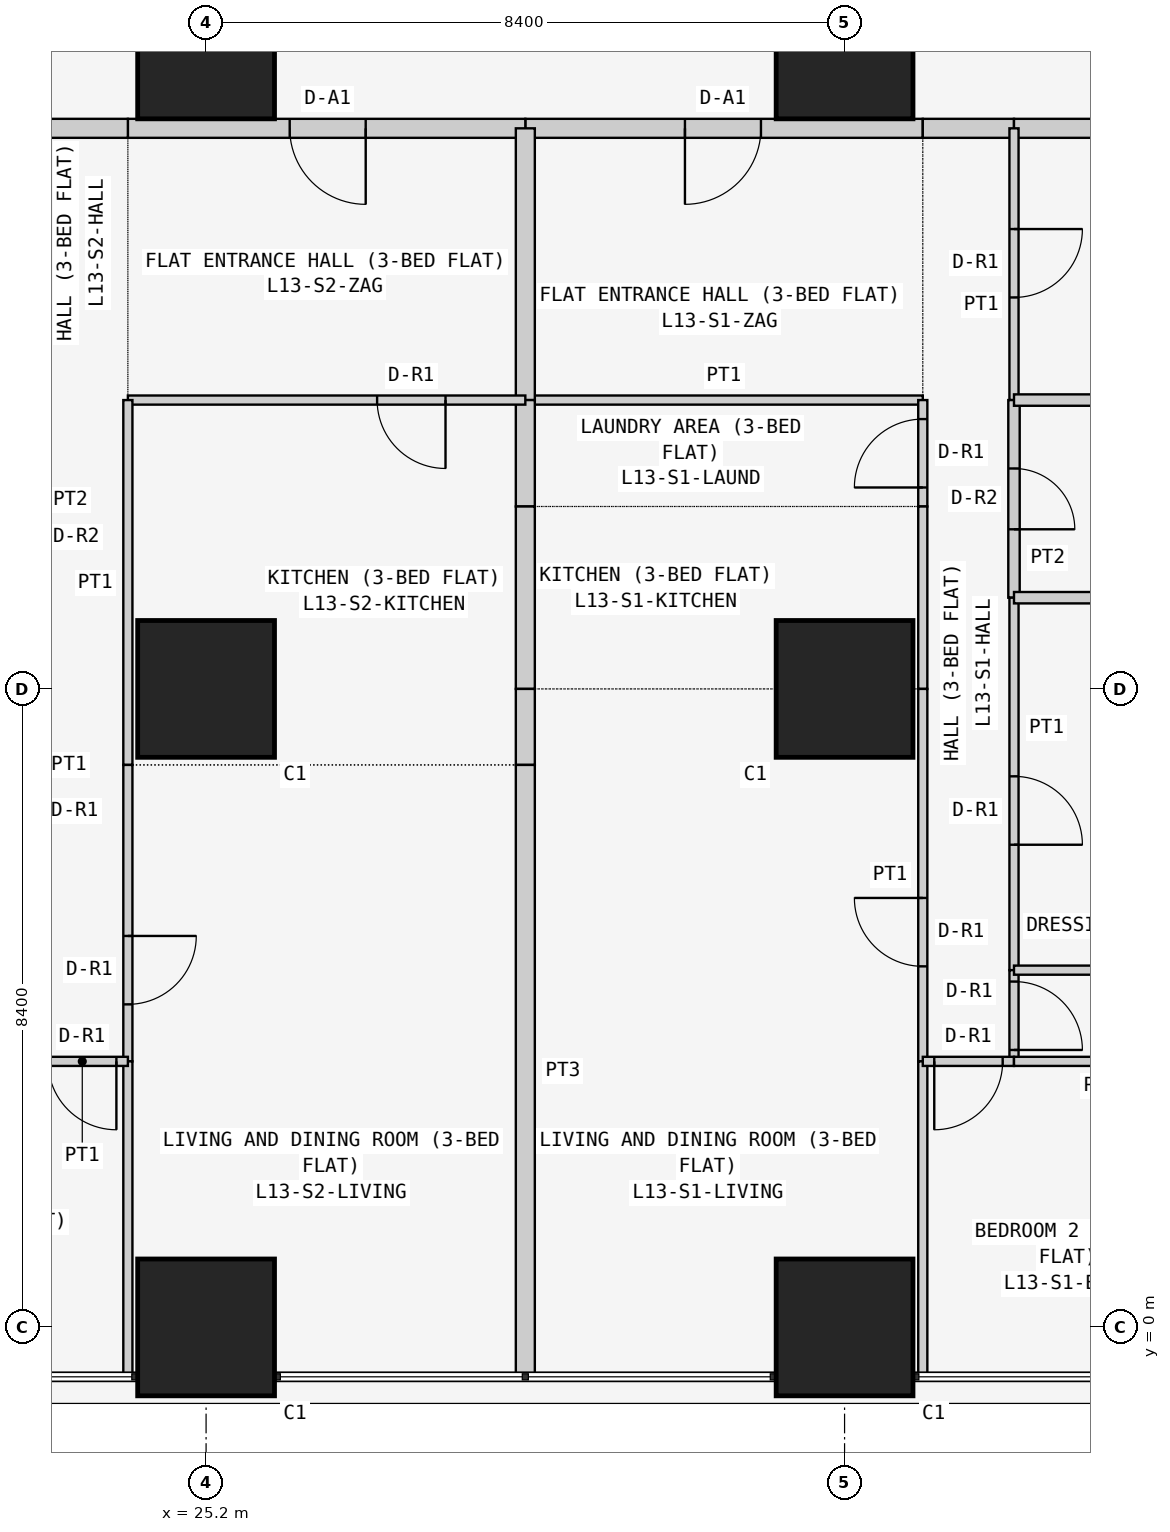
"""IFC4 building model, lengths in metres.
Left out: names, types, materials, properties, quantities, classifications, styles, units other than length and angle.
Written with IfcOpenShell. Run it as: python <this file> out.ifc"""

import sys

from ifc_helpers import new_model, si_unit, direction, frame, frame_2d, origin, origin_2d, place, context, subcontext, project, spatial, rectangle, extrude, element, fill, save


model = new_model("IFC4")
c1 = context("Model", 3, precision=1e-05, world=origin(), true_north=direction((0.0, 1.0)))
c2 = subcontext(c1, "Body", "Model", "MODEL_VIEW")
j1 = project(units=[si_unit("LENGTHUNIT", "METRE"), si_unit("PLANEANGLEUNIT", "RADIAN")], contexts=[c1])
p1 = place(None, origin())
s1 = spatial("IfcSite", under=j1, at=p1, CompositionType="ELEMENT")
p2 = place(p1, origin())
s2 = spatial("IfcBuilding", under=s1, at=p2, CompositionType="ELEMENT")
p3 = place(p2, frame((0.0, 0.0, 56.1)))
s3 = spatial("IfcBuildingStorey", under=s2, at=p3, CompositionType="ELEMENT", Elevation=56.1)
for number, where, z_axis, x_axis in (
    (1, (25.2, 0.0, 0.0), (0.0, 0.0, 1.0), (1.0, 0.0, 0.0)),
    (2, (25.2, 8.4, 0.0), (0.0, 0.0, 1.0), (1.0, 0.0, 0.0)),
    (3, (25.2, 16.8, 0.0), (0.0, 0.0, 1.0), (1.0, 0.0, 0.0)),
    (4, (33.6, 0.0, 0.0), (0.0, 0.0, 1.0), (1.0, 0.0, 0.0)),
    (5, (33.6, 8.4, 0.0), (0.0, 0.0, 1.0), (1.0, 0.0, 0.0)),
    (6, (33.6, 16.8, 0.0), (0.0, 0.0, 1.0), (1.0, 0.0, 0.0)),
):
    element("IfcColumn", number, at=place(p3, frame(where, z_axis=z_axis, x_axis=x_axis)), inside=s3, PredefinedType="COLUMN", context=c2, shape_type="SweptSolid", body=[
        extrude(rectangle(XDim=1.8, YDim=1.8, at=origin_2d()), origin(), (0.0, 0.0, 1.0), 3.6),
    ])
p4 = place(p3, frame((34.629, 15.775, 0.0), z_axis=(0.0, 0.0, 1.0), x_axis=(-1.0, 0.0, 0.0)))
e7 = element("IfcWall", 7, at=p4, inside=s3, PredefinedType="PARTITIONING", context=c2, shape_type="SweptSolid", body=[
    extrude(rectangle(XDim=5.229, YDim=0.25, at=frame_2d((2.615, 0.0))), origin(), (0.0, 0.0, 1.0), 3.45),
])
p5 = place(p4, frame((2.129, 0.0, 0.0)))
e8 = element("IfcOpeningElement", 8, at=p5, cuts=e7, PredefinedType="OPENING", context=c2, shape_type="SweptSolid", body=[
    extrude(rectangle(XDim=1.0, YDim=2.1, at=frame_2d((0.5, 1.05))), frame((0.0, 0.135, 0.0), z_axis=(0.0, -1.0, 0.0), x_axis=(1.0, 0.0, 0.0)), (0.0, 0.0, 1.0), 0.27),
])
p6 = place(p3, frame((35.829, 15.775, 0.0), z_axis=(0.0, 0.0, 1.0), x_axis=(-1.0, 0.0, 0.0)))
e9 = element("IfcWall", 9, at=p6, inside=s3, PredefinedType="PARTITIONING", context=c2, shape_type="SweptSolid", body=[
    extrude(rectangle(XDim=1.2, YDim=0.25, at=frame_2d((0.6, 0.0))), origin(), (0.0, 0.0, 1.0), 3.45),
])
p7 = place(p3, frame((42.7, 15.775, 0.0), z_axis=(0.0, 0.0, 1.0), x_axis=(-1.0, 0.0, 0.0)))
e10 = element("IfcWall", 10, at=p7, inside=s3, PredefinedType="PARTITIONING", context=c2, shape_type="SweptSolid", body=[
    extrude(rectangle(XDim=6.871, YDim=0.25, at=frame_2d((3.436, 0.0))), origin(), (0.0, 0.0, 1.0), 3.45),
])
p8 = place(p3, frame((29.4, 15.775, 0.0), z_axis=(0.0, 0.0, 1.0), x_axis=(-1.0, 0.0, 0.0)))
e11 = element("IfcWall", 11, at=p8, inside=s3, PredefinedType="PARTITIONING", context=c2, shape_type="SweptSolid", body=[
    extrude(rectangle(XDim=5.229, YDim=0.25, at=frame_2d((2.615, 0.0))), origin(), (0.0, 0.0, 1.0), 3.45),
])
p9 = place(p8, frame((2.1, 0.0, 0.0)))
e12 = element("IfcOpeningElement", 12, at=p9, cuts=e11, PredefinedType="OPENING", context=c2, shape_type="SweptSolid", body=[
    extrude(rectangle(XDim=1.0, YDim=2.1, at=frame_2d((0.5, 1.05))), frame((0.0, 0.135, 0.0), z_axis=(0.0, -1.0, 0.0), x_axis=(1.0, 0.0, 0.0)), (0.0, 0.0, 1.0), 0.27),
])
p10 = place(p3, frame((24.171, 15.775, 0.0), z_axis=(0.0, 0.0, 1.0), x_axis=(-1.0, 0.0, 0.0)))
e13 = element("IfcWall", 13, at=p10, inside=s3, PredefinedType="PARTITIONING", context=c2, shape_type="SweptSolid", body=[
    extrude(rectangle(XDim=1.2, YDim=0.25, at=frame_2d((0.6, 0.0))), origin(), (0.0, 0.0, 1.0), 3.45),
])
p11 = place(p3, frame((29.4, 12.2, 0.0), z_axis=(0.0, 0.0, 1.0), x_axis=(1.0, 0.0, 0.0)))
e14 = element("IfcWall", 14, at=p11, inside=s3, PredefinedType="PARTITIONING", context=c2, shape_type="SweptSolid", body=[
    extrude(rectangle(XDim=5.229, YDim=0.12, at=frame_2d((2.615, 0.0))), origin(), (0.0, 0.0, 1.0), 3.45),
])
p12 = place(p3, frame((29.4, 15.775, 0.0), z_axis=(0.0, 0.0, 1.0), x_axis=(0.0, -1.0, 0.0)))
e15 = element("IfcWall", 15, at=p12, inside=s3, PredefinedType="PARTITIONING", context=c2, shape_type="SweptSolid", body=[
    extrude(rectangle(XDim=3.575, YDim=0.25, at=frame_2d((1.788, 0.0))), origin(), (0.0, 0.0, 1.0), 2.848),
])
p13 = place(p3, frame((34.629, 10.8, 0.0), z_axis=(0.0, 0.0, 1.0), x_axis=(0.0, 1.0, 0.0)))
e16 = element("IfcWall", 16, at=p13, inside=s3, PredefinedType="PARTITIONING", context=c2, shape_type="SweptSolid", body=[
    extrude(rectangle(XDim=1.4, YDim=0.12, at=frame_2d((0.7, 0.0))), origin(), (0.0, 0.0, 1.0), 3.45),
])
p14 = place(p13, frame((0.25, 0.0, 0.0)))
e17 = element("IfcOpeningElement", 17, at=p14, cuts=e16, PredefinedType="OPENING", context=c2, shape_type="SweptSolid", body=[
    extrude(rectangle(XDim=0.9, YDim=2.1, at=frame_2d((0.45, 1.05))), frame((0.0, 0.07, 0.0), z_axis=(0.0, -1.0, 0.0), x_axis=(1.0, 0.0, 0.0)), (0.0, 0.0, 1.0), 0.14),
])
p15 = place(p3, frame((29.4, 12.2, 0.0), z_axis=(0.0, 0.0, 1.0), x_axis=(0.0, -1.0, 0.0)))
e18 = element("IfcWall", 18, at=p15, inside=s3, PredefinedType="PARTITIONING", context=c2, shape_type="SweptSolid", body=[
    extrude(rectangle(XDim=1.4, YDim=0.25, at=frame_2d((0.7, 0.0))), origin(), (0.0, 0.0, 1.0), 2.848),
])
p16 = place(p3, frame((34.629, 8.4, 0.0), z_axis=(0.0, 0.0, 1.0), x_axis=(0.0, 1.0, 0.0)))
e19 = element("IfcWall", 19, at=p16, inside=s3, PredefinedType="PARTITIONING", context=c2, shape_type="SweptSolid", body=[
    extrude(rectangle(XDim=2.4, YDim=0.12, at=frame_2d((1.2, 0.0))), origin(), (0.0, 0.0, 1.0), 3.45),
])
p17 = place(p3, frame((29.4, 10.8, 0.0), z_axis=(0.0, 0.0, 1.0), x_axis=(0.0, -1.0, 0.0)))
e20 = element("IfcWall", 20, at=p17, inside=s3, PredefinedType="PARTITIONING", context=c2, shape_type="SweptSolid", body=[
    extrude(rectangle(XDim=2.4, YDim=0.25, at=frame_2d((1.2, 0.0))), origin(), (0.0, 0.0, 1.0), 2.848),
])
p18 = place(p3, frame((34.629, 3.5, 0.0), z_axis=(0.0, 0.0, 1.0), x_axis=(0.0, 1.0, 0.0)))
e21 = element("IfcWall", 21, at=p18, inside=s3, PredefinedType="PARTITIONING", context=c2, shape_type="SweptSolid", body=[
    extrude(rectangle(XDim=4.9, YDim=0.12, at=frame_2d((2.45, 0.0))), origin(), (0.0, 0.0, 1.0), 3.45),
])
p19 = place(p18, frame((1.25, 0.0, 0.0)))
e22 = element("IfcOpeningElement", 22, at=p19, cuts=e21, PredefinedType="OPENING", context=c2, shape_type="SweptSolid", body=[
    extrude(rectangle(XDim=0.9, YDim=2.1, at=frame_2d((0.45, 1.05))), frame((0.0, 0.07, 0.0), z_axis=(0.0, -1.0, 0.0), x_axis=(1.0, 0.0, 0.0)), (0.0, 0.0, 1.0), 0.14),
])
p20 = place(p3, frame((34.629, -0.65, 0.0), z_axis=(0.0, 0.0, 1.0), x_axis=(0.0, 1.0, 0.0)))
e23 = element("IfcWall", 23, at=p20, inside=s3, PredefinedType="PARTITIONING", context=c2, shape_type="SweptSolid", body=[
    extrude(rectangle(XDim=4.15, YDim=0.12, at=frame_2d((2.075, 0.0))), origin(), (0.0, 0.0, 1.0), 3.45),
])
p21 = place(p3, frame((29.4, 8.4, 0.0), z_axis=(0.0, 0.0, 1.0), x_axis=(0.0, -1.0, 0.0)))
e24 = element("IfcWall", 24, at=p21, inside=s3, PredefinedType="PARTITIONING", context=c2, shape_type="SweptSolid", body=[
    extrude(rectangle(XDim=1.0, YDim=0.25, at=frame_2d((0.5, 0.0))), origin(), (0.0, 0.0, 1.0), 2.848),
])
p22 = place(p3, frame((29.4, 7.4, 0.0), z_axis=(0.0, 0.0, 1.0), x_axis=(0.0, -1.0, 0.0)))
e25 = element("IfcWall", 25, at=p22, inside=s3, PredefinedType="PARTITIONING", context=c2, shape_type="SweptSolid", body=[
    extrude(rectangle(XDim=8.05, YDim=0.25, at=frame_2d((4.025, 0.0))), origin(), (0.0, 0.0, 1.0), 2.848),
])
p23 = place(p3, frame((35.829, 12.2, 0.0), z_axis=(0.0, 0.0, 1.0), x_axis=(0.0, 1.0, 0.0)))
e26 = element("IfcWall", 26, at=p23, inside=s3, PredefinedType="PARTITIONING", context=c2, shape_type="SweptSolid", body=[
    extrude(rectangle(XDim=3.575, YDim=0.12, at=frame_2d((1.788, 0.0))), origin(), (0.0, 0.0, 1.0), 3.45),
])
p24 = place(p23, frame((1.35, 0.0, 0.0)))
e27 = element("IfcOpeningElement", 27, at=p24, cuts=e26, PredefinedType="OPENING", context=c2, shape_type="SweptSolid", body=[
    extrude(rectangle(XDim=0.9, YDim=2.1, at=frame_2d((0.45, 1.05))), frame((0.0, 0.07, 0.0), z_axis=(0.0, -1.0, 0.0), x_axis=(1.0, 0.0, 0.0)), (0.0, 0.0, 1.0), 0.14),
])
p25 = place(p3, frame((35.829, 9.6, 0.0), z_axis=(0.0, 0.0, 1.0), x_axis=(0.0, 1.0, 0.0)))
e28 = element("IfcWall", 28, at=p25, inside=s3, PredefinedType="PARTITIONING", context=c2, shape_type="SweptSolid", body=[
    extrude(rectangle(XDim=2.6, YDim=0.15, at=frame_2d((1.3, 0.0))), origin(), (0.0, 0.0, 1.0), 3.45),
])
p26 = place(p25, frame((0.9, 0.0, 0.0)))
e29 = element("IfcOpeningElement", 29, at=p26, cuts=e28, PredefinedType="OPENING", context=c2, shape_type="SweptSolid", body=[
    extrude(rectangle(XDim=0.8, YDim=2.1, at=frame_2d((0.4, 1.05))), frame((0.0, 0.085, 0.0), z_axis=(0.0, -1.0, 0.0), x_axis=(1.0, 0.0, 0.0)), (0.0, 0.0, 1.0), 0.17),
])
p27 = place(p3, frame((35.829, 4.7, 0.0), z_axis=(0.0, 0.0, 1.0), x_axis=(0.0, 1.0, 0.0)))
e30 = element("IfcWall", 30, at=p27, inside=s3, PredefinedType="PARTITIONING", context=c2, shape_type="SweptSolid", body=[
    extrude(rectangle(XDim=4.9, YDim=0.12, at=frame_2d((2.45, 0.0))), origin(), (0.0, 0.0, 1.0), 3.45),
])
p28 = place(p27, frame((1.65, 0.0, 0.0)))
e31 = element("IfcOpeningElement", 31, at=p28, cuts=e30, PredefinedType="OPENING", context=c2, shape_type="SweptSolid", body=[
    extrude(rectangle(XDim=0.9, YDim=2.1, at=frame_2d((0.45, 1.05))), frame((0.0, 0.07, 0.0), z_axis=(0.0, -1.0, 0.0), x_axis=(1.0, 0.0, 0.0)), (0.0, 0.0, 1.0), 0.14),
])
p29 = place(p3, frame((35.829, 3.5, 0.0), z_axis=(0.0, 0.0, 1.0), x_axis=(0.0, 1.0, 0.0)))
e32 = element("IfcWall", 32, at=p29, inside=s3, PredefinedType="PARTITIONING", context=c2, shape_type="SweptSolid", body=[
    extrude(rectangle(XDim=1.2, YDim=0.12, at=frame_2d((0.6, 0.0))), origin(), (0.0, 0.0, 1.0), 3.45),
])
p30 = place(p29, frame((0.15, 0.0, 0.0)))
e33 = element("IfcOpeningElement", 33, at=p30, cuts=e32, PredefinedType="OPENING", context=c2, shape_type="SweptSolid", body=[
    extrude(rectangle(XDim=0.9, YDim=2.1, at=frame_2d((0.45, 1.05))), frame((0.0, 0.07, 0.0), z_axis=(0.0, -1.0, 0.0), x_axis=(1.0, 0.0, 0.0)), (0.0, 0.0, 1.0), 0.14),
])
p31 = place(p3, frame((34.629, 3.5, 0.0), z_axis=(0.0, 0.0, 1.0), x_axis=(1.0, 0.0, 0.0)))
e34 = element("IfcWall", 34, at=p31, inside=s3, PredefinedType="PARTITIONING", context=c2, shape_type="SweptSolid", body=[
    extrude(rectangle(XDim=1.2, YDim=0.12, at=frame_2d((0.6, 0.0))), origin(), (0.0, 0.0, 1.0), 3.45),
])
p32 = place(p31, frame((0.151, 0.0, 0.0)))
e35 = element("IfcOpeningElement", 35, at=p32, cuts=e34, PredefinedType="OPENING", context=c2, shape_type="SweptSolid", body=[
    extrude(rectangle(XDim=0.9, YDim=2.1, at=frame_2d((0.45, 1.05))), frame((0.0, 0.07, 0.0), z_axis=(0.0, -1.0, 0.0), x_axis=(1.0, 0.0, 0.0)), (0.0, 0.0, 1.0), 0.14),
])
for number, where, z_axis, x_axis in (
    (36, (35.829, 12.2, 0.0), (0.0, 0.0, 1.0), (1.0, 0.0, 0.0)),
    (37, (35.829, 9.6, 0.0), (0.0, 0.0, 1.0), (1.0, 0.0, 0.0)),
):
    element("IfcWall", number, at=place(p3, frame(where, z_axis=z_axis, x_axis=x_axis)), inside=s3, PredefinedType="PARTITIONING", context=c2, shape_type="SweptSolid", body=[
        extrude(rectangle(XDim=2.971, YDim=0.15, at=frame_2d((1.485, 0.0))), origin(), (0.0, 0.0, 1.0), 3.45),
    ])
for number, where, z_axis, x_axis in (
    (38, (35.829, 4.7, 0.0), (0.0, 0.0, 1.0), (1.0, 0.0, 0.0)),
    (39, (35.829, 3.5, 0.0), (0.0, 0.0, 1.0), (1.0, 0.0, 0.0)),
):
    element("IfcWall", number, at=place(p3, frame(where, z_axis=z_axis, x_axis=x_axis)), inside=s3, PredefinedType="PARTITIONING", context=c2, shape_type="SweptSolid", body=[
        extrude(rectangle(XDim=2.285, YDim=0.12, at=frame_2d((1.143, 0.0))), origin(), (0.0, 0.0, 1.0), 3.45),
    ])
p33 = place(p3, frame((29.4, 12.2, 0.0), z_axis=(0.0, 0.0, 1.0), x_axis=(-1.0, 0.0, 0.0)))
e40 = element("IfcWall", 40, at=p33, inside=s3, PredefinedType="PARTITIONING", context=c2, shape_type="SweptSolid", body=[
    extrude(rectangle(XDim=5.229, YDim=0.12, at=frame_2d((2.615, 0.0))), origin(), (0.0, 0.0, 1.0), 3.45),
])
p34 = place(p33, frame((1.05, 0.0, 0.0)))
e41 = element("IfcOpeningElement", 41, at=p34, cuts=e40, PredefinedType="OPENING", context=c2, shape_type="SweptSolid", body=[
    extrude(rectangle(XDim=0.9, YDim=2.1, at=frame_2d((0.45, 1.05))), frame((0.0, 0.07, 0.0), z_axis=(0.0, -1.0, 0.0), x_axis=(1.0, 0.0, 0.0)), (0.0, 0.0, 1.0), 0.14),
])
p35 = place(p3, frame((24.171, 7.4, 0.0), z_axis=(0.0, 0.0, 1.0), x_axis=(0.0, 1.0, 0.0)))
e42 = element("IfcWall", 42, at=p35, inside=s3, PredefinedType="PARTITIONING", context=c2, shape_type="SweptSolid", body=[
    extrude(rectangle(XDim=4.8, YDim=0.12, at=frame_2d((2.4, 0.0))), origin(), (0.0, 0.0, 1.0), 3.45),
])
p36 = place(p3, frame((24.171, 3.5, 0.0), z_axis=(0.0, 0.0, 1.0), x_axis=(0.0, 1.0, 0.0)))
e43 = element("IfcWall", 43, at=p36, inside=s3, PredefinedType="PARTITIONING", context=c2, shape_type="SweptSolid", body=[
    extrude(rectangle(XDim=3.9, YDim=0.12, at=frame_2d((1.95, 0.0))), origin(), (0.0, 0.0, 1.0), 3.45),
])
p37 = place(p36, frame((0.75, 0.0, 0.0)))
e44 = element("IfcOpeningElement", 44, at=p37, cuts=e43, PredefinedType="OPENING", context=c2, shape_type="SweptSolid", body=[
    extrude(rectangle(XDim=0.9, YDim=2.1, at=frame_2d((0.45, 1.05))), frame((0.0, 0.07, 0.0), z_axis=(0.0, -1.0, 0.0), x_axis=(1.0, 0.0, 0.0)), (0.0, 0.0, 1.0), 0.14),
])
p38 = place(p3, frame((24.171, -0.65, 0.0), z_axis=(0.0, 0.0, 1.0), x_axis=(0.0, 1.0, 0.0)))
e45 = element("IfcWall", 45, at=p38, inside=s3, PredefinedType="PARTITIONING", context=c2, shape_type="SweptSolid", body=[
    extrude(rectangle(XDim=4.15, YDim=0.12, at=frame_2d((2.075, 0.0))), origin(), (0.0, 0.0, 1.0), 3.45),
])
p39 = place(p3, frame((24.171, 3.5, 0.0), z_axis=(0.0, 0.0, 1.0), x_axis=(-1.0, 0.0, 0.0)))
e46 = element("IfcWall", 46, at=p39, inside=s3, PredefinedType="PARTITIONING", context=c2, shape_type="SweptSolid", body=[
    extrude(rectangle(XDim=1.2, YDim=0.12, at=frame_2d((0.6, 0.0))), origin(), (0.0, 0.0, 1.0), 3.45),
])
p40 = place(p39, frame((0.151, 0.0, 0.0)))
e47 = element("IfcOpeningElement", 47, at=p40, cuts=e46, PredefinedType="OPENING", context=c2, shape_type="SweptSolid", body=[
    extrude(rectangle(XDim=0.9, YDim=2.1, at=frame_2d((0.45, 1.05))), frame((0.0, 0.07, 0.0), z_axis=(0.0, -1.0, 0.0), x_axis=(1.0, 0.0, 0.0)), (0.0, 0.0, 1.0), 0.14),
])
p41 = place(p5, origin())
e48 = element("IfcDoor", 48, at=p41, inside=s3, OperationType="SINGLE_SWING_RIGHT", PredefinedType="DOOR", context=c2, shape_type="SweptSolid", body=[
    extrude(rectangle(XDim=1.0, YDim=2.1, at=frame_2d((0.5, 1.05))), frame((0.0, 0.025, 0.0), z_axis=(0.0, -1.0, 0.0), x_axis=(1.0, 0.0, 0.0)), (0.0, 0.0, 1.0), 0.05),
])
fill(e8, e48)
p42 = place(p14, origin())
e49 = element("IfcDoor", 49, at=p42, inside=s3, OperationType="SINGLE_SWING_LEFT", PredefinedType="DOOR", context=c2, shape_type="SweptSolid", body=[
    extrude(rectangle(XDim=0.9, YDim=2.1, at=frame_2d((0.45, 1.05))), frame((0.0, 0.025, 0.0), z_axis=(0.0, -1.0, 0.0), x_axis=(1.0, 0.0, 0.0)), (0.0, 0.0, 1.0), 0.05),
])
fill(e17, e49)
p43 = place(p19, origin())
e50 = element("IfcDoor", 50, at=p43, inside=s3, OperationType="SINGLE_SWING_RIGHT", PredefinedType="DOOR", context=c2, shape_type="SweptSolid", body=[
    extrude(rectangle(XDim=0.9, YDim=2.1, at=frame_2d((0.45, 1.05))), frame((0.0, 0.025, 0.0), z_axis=(0.0, -1.0, 0.0), x_axis=(1.0, 0.0, 0.0)), (0.0, 0.0, 1.0), 0.05),
])
fill(e22, e50)
p44 = place(p24, frame((0.9, 0.0, 0.0), z_axis=(0.0, 0.0, 1.0), x_axis=(-1.0, 0.0, 0.0)))
e51 = element("IfcDoor", 51, at=p44, inside=s3, OperationType="SINGLE_SWING_LEFT", PredefinedType="DOOR", context=c2, shape_type="SweptSolid", body=[
    extrude(rectangle(XDim=0.9, YDim=2.1, at=frame_2d((0.45, 1.05))), frame((0.0, 0.025, 0.0), z_axis=(0.0, -1.0, 0.0), x_axis=(1.0, 0.0, 0.0)), (0.0, 0.0, 1.0), 0.05),
])
fill(e27, e51)
p45 = place(p26, frame((0.8, 0.0, 0.0), z_axis=(0.0, 0.0, 1.0), x_axis=(-1.0, 0.0, 0.0)))
e52 = element("IfcDoor", 52, at=p45, inside=s3, OperationType="SINGLE_SWING_RIGHT", PredefinedType="DOOR", context=c2, shape_type="SweptSolid", body=[
    extrude(rectangle(XDim=0.8, YDim=2.1, at=frame_2d((0.4, 1.05))), frame((0.0, 0.025, 0.0), z_axis=(0.0, -1.0, 0.0), x_axis=(1.0, 0.0, 0.0)), (0.0, 0.0, 1.0), 0.05),
])
fill(e29, e52)
p46 = place(p28, frame((0.9, 0.0, 0.0), z_axis=(0.0, 0.0, 1.0), x_axis=(-1.0, 0.0, 0.0)))
e53 = element("IfcDoor", 53, at=p46, inside=s3, OperationType="SINGLE_SWING_RIGHT", PredefinedType="DOOR", context=c2, shape_type="SweptSolid", body=[
    extrude(rectangle(XDim=0.9, YDim=2.1, at=frame_2d((0.45, 1.05))), frame((0.0, 0.025, 0.0), z_axis=(0.0, -1.0, 0.0), x_axis=(1.0, 0.0, 0.0)), (0.0, 0.0, 1.0), 0.05),
])
fill(e31, e53)
p47 = place(p30, frame((0.9, 0.0, 0.0), z_axis=(0.0, 0.0, 1.0), x_axis=(-1.0, 0.0, 0.0)))
e54 = element("IfcDoor", 54, at=p47, inside=s3, OperationType="SINGLE_SWING_RIGHT", PredefinedType="DOOR", context=c2, shape_type="SweptSolid", body=[
    extrude(rectangle(XDim=0.9, YDim=2.1, at=frame_2d((0.45, 1.05))), frame((0.0, 0.025, 0.0), z_axis=(0.0, -1.0, 0.0), x_axis=(1.0, 0.0, 0.0)), (0.0, 0.0, 1.0), 0.05),
])
fill(e33, e54)
p48 = place(p32, frame((0.9, 0.0, 0.0), z_axis=(0.0, 0.0, 1.0), x_axis=(-1.0, 0.0, 0.0)))
e55 = element("IfcDoor", 55, at=p48, inside=s3, OperationType="SINGLE_SWING_RIGHT", PredefinedType="DOOR", context=c2, shape_type="SweptSolid", body=[
    extrude(rectangle(XDim=0.9, YDim=2.1, at=frame_2d((0.45, 1.05))), frame((0.0, 0.025, 0.0), z_axis=(0.0, -1.0, 0.0), x_axis=(1.0, 0.0, 0.0)), (0.0, 0.0, 1.0), 0.05),
])
fill(e35, e55)
p49 = place(p9, origin())
e56 = element("IfcDoor", 56, at=p49, inside=s3, OperationType="SINGLE_SWING_LEFT", PredefinedType="DOOR", context=c2, shape_type="SweptSolid", body=[
    extrude(rectangle(XDim=1.0, YDim=2.1, at=frame_2d((0.5, 1.05))), frame((0.0, 0.025, 0.0), z_axis=(0.0, -1.0, 0.0), x_axis=(1.0, 0.0, 0.0)), (0.0, 0.0, 1.0), 0.05),
])
fill(e12, e56)
p50 = place(p34, origin())
e57 = element("IfcDoor", 57, at=p50, inside=s3, OperationType="SINGLE_SWING_LEFT", PredefinedType="DOOR", context=c2, shape_type="SweptSolid", body=[
    extrude(rectangle(XDim=0.9, YDim=2.1, at=frame_2d((0.45, 1.05))), frame((0.0, 0.025, 0.0), z_axis=(0.0, -1.0, 0.0), x_axis=(1.0, 0.0, 0.0)), (0.0, 0.0, 1.0), 0.05),
])
fill(e41, e57)
p51 = place(p37, frame((0.9, 0.0, 0.0), z_axis=(0.0, 0.0, 1.0), x_axis=(-1.0, 0.0, 0.0)))
e58 = element("IfcDoor", 58, at=p51, inside=s3, OperationType="SINGLE_SWING_LEFT", PredefinedType="DOOR", context=c2, shape_type="SweptSolid", body=[
    extrude(rectangle(XDim=0.9, YDim=2.1, at=frame_2d((0.45, 1.05))), frame((0.0, 0.025, 0.0), z_axis=(0.0, -1.0, 0.0), x_axis=(1.0, 0.0, 0.0)), (0.0, 0.0, 1.0), 0.05),
])
fill(e44, e58)
p52 = place(p40, origin())
e59 = element("IfcDoor", 59, at=p52, inside=s3, OperationType="SINGLE_SWING_LEFT", PredefinedType="DOOR", context=c2, shape_type="SweptSolid", body=[
    extrude(rectangle(XDim=0.9, YDim=2.1, at=frame_2d((0.45, 1.05))), frame((0.0, 0.025, 0.0), z_axis=(0.0, -1.0, 0.0), x_axis=(1.0, 0.0, 0.0)), (0.0, 0.0, 1.0), 0.05),
])
fill(e47, e59)
save(model, sys.argv[1])
